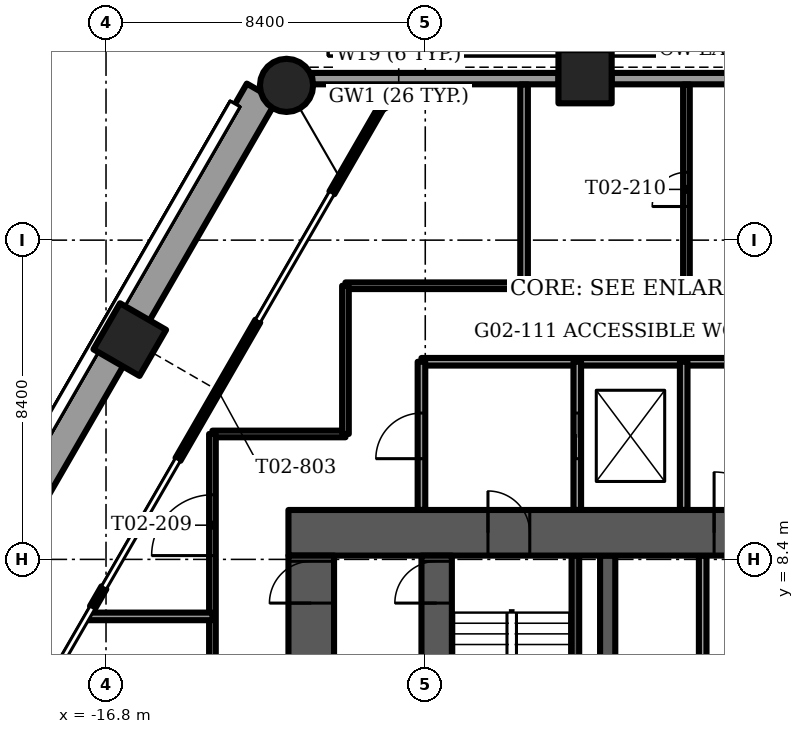
"""IFC4 building model, lengths in metres.
Left out: names, types, materials, properties, quantities, classifications, styles, units other than length and angle.
Written with IfcOpenShell. Run it as: python <this file> out.ifc"""

import sys

from ifc_helpers import new_model, si_unit, direction, frame, frame_2d, origin, origin_2d, place, context, subcontext, project, spatial, rectangle, circle, extrude, element, fill, save


model = new_model("IFC4")
c1 = context("Model", 3, precision=1e-05, world=origin(), true_north=direction((0.0, 1.0)))
c2 = subcontext(c1, "Body", "Model", "MODEL_VIEW")
j1 = project(units=[si_unit("LENGTHUNIT", "METRE"), si_unit("PLANEANGLEUNIT", "RADIAN")], contexts=[c1])
p1 = place(None, origin())
s1 = spatial("IfcSite", under=j1, at=p1, CompositionType="ELEMENT")
p2 = place(p1, origin())
s2 = spatial("IfcBuilding", under=s1, at=p2, CompositionType="ELEMENT")
p3 = place(p2, frame((0.0, 0.0, 10.0)))
s3 = spatial("IfcBuildingStorey", under=s2, at=p3, CompositionType="ELEMENT", Elevation=10.0)
p4 = place(p3, frame((-12.051, 20.872, -1.2), z_axis=(0.0, 0.0, 1.0), x_axis=(1.0, 0.0, 0.0)))
e1 = element("IfcColumn", 1, at=p4, inside=s3, PredefinedType="COLUMN", context=c2, shape_type="SweptSolid", body=[
    extrude(circle(Radius=0.7, at=origin_2d()), origin(), (0.0, 0.0, 1.0), 4.5),
])
for number, where, z_axis, x_axis in (
    (2, (-4.195, 21.1, -1.2), (0.0, 0.0, 1.0), (1.0, 0.0, 0.0)),
    (3, (-16.175, 14.183, -1.2), (0.0, 0.0, 1.0), (0.5, 0.866, 0.0)),
):
    element("IfcColumn", number, at=place(p3, frame(where, z_axis=z_axis, x_axis=x_axis)), inside=s3, PredefinedType="COLUMN", context=c2, shape_type="SweptSolid", body=[
        extrude(rectangle(XDim=1.4, YDim=1.4, at=origin_2d()), origin(), (0.0, 0.0, 1.0), 4.5),
    ])
p5 = place(p3, frame((-12.0, 9.1, -0.3), z_axis=(0.0, 0.0, 1.0), x_axis=(1.0, 0.0, 0.0)))
e4 = element("IfcWall", 4, at=p5, inside=s3, PredefinedType="SHEAR", context=c2, shape_type="SweptSolid", body=[
    extrude(rectangle(XDim=24.0, YDim=1.2, at=frame_2d((12.0, 0.0))), origin(), (0.0, 0.0, 1.0), 4.5),
])
p6 = place(p5, frame((11.2, 0.0, 0.0)))
e5 = element("IfcOpeningElement", 5, at=p6, cuts=e4, PredefinedType="OPENING", context=c2, shape_type="SweptSolid", body=[
    extrude(rectangle(XDim=1.6, YDim=2.1, at=frame_2d((0.8, 1.05))), frame((0.0, 0.6, 0.0), z_axis=(0.0, -1.0, 0.0), x_axis=(1.0, 0.0, 0.0)), (0.0, 0.0, 1.0), 1.2),
])
p7 = place(p5, frame((5.25, 0.0, 0.0)))
e6 = element("IfcOpeningElement", 6, at=p7, cuts=e4, PredefinedType="OPENING", context=c2, shape_type="SweptSolid", body=[
    extrude(rectangle(XDim=1.1, YDim=2.1, at=frame_2d((0.55, 1.05))), frame((0.0, 0.6, 0.0), z_axis=(0.0, -1.0, 0.0), x_axis=(1.0, 0.0, 0.0)), (0.0, 0.0, 1.0), 1.2),
])
p8 = place(p5, frame((17.65, 0.0, 0.0)))
e7 = element("IfcOpeningElement", 7, at=p8, cuts=e4, PredefinedType="OPENING", context=c2, shape_type="SweptSolid", body=[
    extrude(rectangle(XDim=1.1, YDim=2.1, at=frame_2d((0.55, 1.05))), frame((0.0, 0.6, 0.0), z_axis=(0.0, -1.0, 0.0), x_axis=(1.0, 0.0, 0.0)), (0.0, 0.0, 1.0), 1.2),
])
p9 = place(p3, frame((-8.1, -0.5, -0.3), z_axis=(0.0, 0.0, 1.0), x_axis=(0.0, 1.0, 0.0)))
e8 = element("IfcWall", 8, at=p9, inside=s3, PredefinedType="SHEAR", context=c2, shape_type="SweptSolid", body=[
    extrude(rectangle(XDim=9.0, YDim=0.8, at=frame_2d((4.5, 0.0))), origin(), (0.0, 0.0, 1.0), 4.5),
])
p10 = place(p9, frame((7.75, 0.0, 0.0)))
e9 = element("IfcOpeningElement", 9, at=p10, cuts=e8, PredefinedType="OPENING", context=c2, shape_type="SweptSolid", body=[
    extrude(rectangle(XDim=1.1, YDim=2.1, at=frame_2d((0.55, 1.05))), frame((0.0, 0.4, 0.0), z_axis=(0.0, -1.0, 0.0), x_axis=(1.0, 0.0, 0.0)), (0.0, 0.0, 1.0), 0.8),
])
p11 = place(p3, frame((-3.6, -0.5, -0.3), z_axis=(0.0, 0.0, 1.0), x_axis=(0.0, 1.0, 0.0)))
e10 = element("IfcWall", 10, at=p11, inside=s3, PredefinedType="SHEAR", context=c2, shape_type="SweptSolid", body=[
    extrude(rectangle(XDim=9.0, YDim=0.4, at=frame_2d((4.5, 0.0))), origin(), (0.0, 0.0, 1.0), 4.5),
])
p12 = place(p3, frame((-11.4, -0.5, -0.3), z_axis=(0.0, 0.0, 1.0), x_axis=(0.0, 1.0, 0.0)))
e11 = element("IfcWall", 11, at=p12, inside=s3, PredefinedType="SHEAR", context=c2, shape_type="SweptSolid", body=[
    extrude(rectangle(XDim=9.0, YDim=1.2, at=frame_2d((4.5, 0.0))), origin(), (0.0, 0.0, 1.0), 4.5),
])
p13 = place(p12, frame((7.75, 0.0, 0.0)))
e12 = element("IfcOpeningElement", 12, at=p13, cuts=e11, PredefinedType="OPENING", context=c2, shape_type="SweptSolid", body=[
    extrude(rectangle(XDim=1.1, YDim=2.1, at=frame_2d((0.55, 1.05))), frame((0.0, 0.6, 0.0), z_axis=(0.0, -1.0, 0.0), x_axis=(1.0, 0.0, 0.0)), (0.0, 0.0, 1.0), 1.2),
])
p14 = place(p12, frame((0.55, 0.0, 0.0)))
e13 = element("IfcOpeningElement", 13, at=p14, cuts=e11, PredefinedType="OPENING", context=c2, shape_type="SweptSolid", body=[
    extrude(rectangle(XDim=1.2, YDim=2.1, at=frame_2d((0.6, 1.05))), frame((0.0, 0.6, 0.0), z_axis=(0.0, -1.0, 0.0), x_axis=(1.0, 0.0, 0.0)), (0.0, 0.0, 1.0), 1.2),
])
p15 = place(p12, frame((3.0, 0.0, 0.0)))
e14 = element("IfcOpeningElement", 14, at=p15, cuts=e11, PredefinedType="OPENING", context=c2, shape_type="SweptSolid", body=[
    extrude(rectangle(XDim=1.2, YDim=2.1, at=frame_2d((0.6, 1.05))), frame((0.0, 0.6, 0.0), z_axis=(0.0, -1.0, 0.0), x_axis=(1.0, 0.0, 0.0)), (0.0, 0.0, 1.0), 1.2),
])
p16 = place(p3, frame((-12.705, 20.694, 0.0), z_axis=(0.0, 0.0, 1.0), x_axis=(-0.500005133765, -0.866022439784, 0.0)))
e15 = element("IfcWall", 15, at=p16, inside=s3, PredefinedType="PARAPET", context=c2, shape_type="SweptSolid", body=[
    extrude(rectangle(XDim=6.704, YDim=0.9, at=frame_2d((3.352, 0.0))), origin(), (0.0, 0.0, 1.0), 1.1),
])
p17 = place(p3, frame((-16.727, 13.728, 0.0), z_axis=(0.0, 0.0, 1.0), x_axis=(-0.499997206141, -0.866027016814, 0.0)))
e16 = element("IfcWall", 16, at=p17, inside=s3, PredefinedType="PARAPET", context=c2, shape_type="SweptSolid", body=[
    extrude(rectangle(XDim=7.051, YDim=0.9, at=frame_2d((3.525, 0.0))), origin(), (0.0, 0.0, 1.0), 1.1),
])
p18 = place(p3, frame((3.495, 21.05, 0.0), z_axis=(0.0, 0.0, 1.0), x_axis=(-1.0, 0.0, 0.0)))
e17 = element("IfcWall", 17, at=p18, inside=s3, PredefinedType="SOLIDWALL", context=c2, shape_type="SweptSolid", body=[
    extrude(rectangle(XDim=6.991, YDim=0.3, at=frame_2d((3.495, 0.0))), origin(), (0.0, 0.0, 1.0), 3.3),
])
p19 = place(p3, frame((-4.896, 21.05, 0.0), z_axis=(0.0, 0.0, 1.0), x_axis=(-1.0, 0.0, 0.0)))
e18 = element("IfcWall", 18, at=p19, inside=s3, PredefinedType="SOLIDWALL", context=c2, shape_type="SweptSolid", body=[
    extrude(rectangle(XDim=6.481, YDim=0.3, at=frame_2d((3.241, 0.0))), origin(), (0.0, 0.0, 1.0), 3.3),
])
p20 = place(p3, frame((-12.806, 14.668, 0.0), z_axis=(0.0, 0.0, 1.0), x_axis=(-0.500027713859, -0.866009402589, 0.0)))
e19 = element("IfcWall", 19, at=p20, inside=s3, PredefinedType="SOLIDWALL", context=c2, shape_type="SweptSolid", body=[
    extrude(rectangle(XDim=4.2, YDim=0.15, at=frame_2d((2.1, 0.0))), origin(), (0.0, 0.0, 1.0), 4.2),
])
p21 = place(p20, frame((0.6, 0.0, 0.0)))
e20 = element("IfcOpeningElement", 20, at=p21, cuts=e19, PredefinedType="OPENING", context=c2, shape_type="SweptSolid", body=[
    extrude(rectangle(XDim=3.0, YDim=2.4, at=frame_2d((1.5, 1.2))), frame((0.0, 0.075, 0.0), z_axis=(0.0, -1.0, 0.0), x_axis=(1.0, 0.0, 0.0)), (0.0, 0.0, 1.0), 0.15),
])
p22 = place(p3, frame((-9.56, 20.292, 0.0), z_axis=(0.0, 0.0, 1.0), x_axis=(-0.499945140294, -0.866057074734, 0.0)))
e21 = element("IfcWall", 21, at=p22, inside=s3, PredefinedType="SOLIDWALL", context=c2, shape_type="SweptSolid", body=[
    extrude(rectangle(XDim=2.594, YDim=0.15, at=frame_2d((1.297, 0.0))), origin(), (0.0, 0.0, 1.0), 4.2),
])
p23 = place(p3, frame((-16.856, 7.654, 0.0), z_axis=(0.0, 0.0, 1.0), x_axis=(-0.499945471869, -0.866056883327, 0.0)))
e22 = element("IfcWall", 22, at=p23, inside=s3, PredefinedType="SOLIDWALL", context=c2, shape_type="SweptSolid", body=[
    extrude(rectangle(XDim=0.6, YDim=0.15, at=frame_2d((0.3, 0.0))), origin(), (0.0, 0.0, 1.0), 4.2),
])
p24 = place(p3, frame((-8.637, 20.825, 0.0), z_axis=(0.0, 0.0, 1.0), x_axis=(-0.866048165231, -0.499960573946, 0.0)))
e23 = element("IfcWall", 23, at=p24, inside=s3, PredefinedType="SOLIDWALL", context=c2, shape_type="SweptSolid", body=[
    extrude(rectangle(XDim=1.065, YDim=0.15, at=frame_2d((0.532, 0.0))), origin(), (0.0, 0.0, 1.0), 4.2),
])
p25 = place(p24, frame((0.258, 0.0, 0.15)))
e24 = element("IfcOpeningElement", 24, at=p25, cuts=e23, PredefinedType="OPENING", context=c2, shape_type="SweptSolid", body=[
    extrude(rectangle(XDim=0.55, YDim=3.6, at=frame_2d((0.275, 1.8))), frame((0.0, 0.075, 0.0), z_axis=(0.0, -1.0, 0.0), x_axis=(1.0, 0.0, 0.0)), (0.0, 0.0, 1.0), 0.15),
])
p26 = place(p3, frame((-1.1, 5.6, 0.0), z_axis=(0.0, 0.0, 1.0), x_axis=(0.0, 1.0, 0.0)))
e25 = element("IfcWall", 25, at=p26, inside=s3, PredefinedType="PARTITIONING", context=c2, shape_type="SweptSolid", body=[
    extrude(rectangle(XDim=2.9, YDim=0.2, at=frame_2d((1.45, 0.0))), origin(), (0.0, 0.0, 1.0), 4.2),
])
p27 = place(p3, frame((-4.45, 0.9, -0.3), z_axis=(0.0, 0.0, 1.0), x_axis=(0.0, 1.0, 0.0)))
e26 = element("IfcWall", 26, at=p27, inside=s3, PredefinedType="SOLIDWALL", context=c2, shape_type="SweptSolid", body=[
    extrude(rectangle(XDim=7.6, YDim=0.2, at=frame_2d((3.8, 0.0))), origin(), (0.0, 0.0, 1.0), 4.5),
])
p28 = place(p3, frame((-8.5, 13.6, 0.0), z_axis=(0.0, 0.0, 1.0), x_axis=(1.0, 0.0, 0.0)))
e27 = element("IfcWall", 27, at=p28, inside=s3, PredefinedType="PARTITIONING", context=c2, shape_type="SweptSolid", body=[
    extrude(rectangle(XDim=17.0, YDim=0.2, at=frame_2d((8.5, 0.0))), origin(), (0.0, 0.0, 1.0), 4.2),
])
p29 = place(p3, frame((-8.5, 9.7, 0.0), z_axis=(0.0, 0.0, 1.0), x_axis=(0.0, 1.0, 0.0)))
e28 = element("IfcWall", 28, at=p29, inside=s3, PredefinedType="PARTITIONING", context=c2, shape_type="SweptSolid", body=[
    extrude(rectangle(XDim=3.9, YDim=0.2, at=frame_2d((1.95, 0.0))), origin(), (0.0, 0.0, 1.0), 4.2),
])
p30 = place(p29, frame((1.35, 0.0, 0.0)))
e29 = element("IfcOpeningElement", 29, at=p30, cuts=e28, PredefinedType="OPENING", context=c2, shape_type="SweptSolid", body=[
    extrude(rectangle(XDim=1.2, YDim=2.1, at=frame_2d((0.6, 1.05))), frame((0.0, 0.1, 0.0), z_axis=(0.0, -1.0, 0.0), x_axis=(1.0, 0.0, 0.0)), (0.0, 0.0, 1.0), 0.2),
])
p31 = place(p3, frame((-4.4, 9.7, 0.0), z_axis=(0.0, 0.0, 1.0), x_axis=(0.0, 1.0, 0.0)))
e30 = element("IfcWall", 30, at=p31, inside=s3, PredefinedType="PARTITIONING", context=c2, shape_type="SweptSolid", body=[
    extrude(rectangle(XDim=3.9, YDim=0.2, at=frame_2d((1.95, 0.0))), origin(), (0.0, 0.0, 1.0), 4.2),
])
p32 = place(p31, frame((1.35, 0.0, 0.0)))
e31 = element("IfcOpeningElement", 31, at=p32, cuts=e30, PredefinedType="OPENING", context=c2, shape_type="SweptSolid", body=[
    extrude(rectangle(XDim=1.2, YDim=2.1, at=frame_2d((0.6, 1.05))), frame((0.0, 0.1, 0.0), z_axis=(0.0, -1.0, 0.0), x_axis=(1.0, 0.0, 0.0)), (0.0, 0.0, 1.0), 0.2),
])
p33 = place(p3, frame((-1.6, 9.7, 0.0), z_axis=(0.0, 0.0, 1.0), x_axis=(0.0, 1.0, 0.0)))
e32 = element("IfcWall", 32, at=p33, inside=s3, PredefinedType="PARTITIONING", context=c2, shape_type="SweptSolid", body=[
    extrude(rectangle(XDim=3.9, YDim=0.2, at=frame_2d((1.95, 0.0))), origin(), (0.0, 0.0, 1.0), 4.2),
])
p34 = place(p3, frame((-14.0, 11.7, 0.0), z_axis=(0.0, 0.0, 1.0), x_axis=(1.0, 0.0, 0.0)))
e33 = element("IfcWall", 33, at=p34, inside=s3, PredefinedType="PARTITIONING", context=c2, shape_type="SweptSolid", body=[
    extrude(rectangle(XDim=3.5, YDim=0.175, at=frame_2d((1.75, 0.0))), origin(), (0.0, 0.0, 1.0), 4.2),
])
p35 = place(p3, frame((-10.5, 15.6, 0.0), z_axis=(0.0, 0.0, 1.0), x_axis=(1.0, 0.0, 0.0)))
e34 = element("IfcWall", 34, at=p35, inside=s3, PredefinedType="PARTITIONING", context=c2, shape_type="SweptSolid", body=[
    extrude(rectangle(XDim=8.972, YDim=0.175, at=frame_2d((4.486, 0.0))), origin(), (0.0, 0.0, 1.0), 4.2),
])
p36 = place(p3, frame((-14.0, -3.7, 0.0), z_axis=(0.0, 0.0, 1.0), x_axis=(0.0, 1.0, 0.0)))
e35 = element("IfcWall", 35, at=p36, inside=s3, PredefinedType="PARTITIONING", context=c2, shape_type="SweptSolid", body=[
    extrude(rectangle(XDim=15.4, YDim=0.175, at=frame_2d((7.7, 0.0))), origin(), (0.0, 0.0, 1.0), 4.2),
])
p37 = place(p36, frame((4.8, 0.0, 0.0)))
e36 = element("IfcOpeningElement", 36, at=p37, cuts=e35, PredefinedType="OPENING", context=c2, shape_type="SweptSolid", body=[
    extrude(rectangle(XDim=1.0, YDim=2.1, at=frame_2d((0.5, 1.05))), frame((0.0, 0.087, 0.0), z_axis=(0.0, -1.0, 0.0), x_axis=(1.0, 0.0, 0.0)), (0.0, 0.0, 1.0), 0.175),
])
p38 = place(p36, frame((12.2, 0.0, 0.0)))
e37 = element("IfcOpeningElement", 37, at=p38, cuts=e35, PredefinedType="OPENING", context=c2, shape_type="SweptSolid", body=[
    extrude(rectangle(XDim=1.6, YDim=2.1, at=frame_2d((0.8, 1.05))), frame((0.0, 0.087, 0.0), z_axis=(0.0, -1.0, 0.0), x_axis=(1.0, 0.0, 0.0)), (0.0, 0.0, 1.0), 0.175),
])
p39 = place(p3, frame((-10.5, 11.7, 0.0), z_axis=(0.0, 0.0, 1.0), x_axis=(0.0, 1.0, 0.0)))
e38 = element("IfcWall", 38, at=p39, inside=s3, PredefinedType="PARTITIONING", context=c2, shape_type="SweptSolid", body=[
    extrude(rectangle(XDim=3.9, YDim=0.175, at=frame_2d((1.95, 0.0))), origin(), (0.0, 0.0, 1.0), 4.2),
])
p40 = place(p3, frame((-1.528, 15.6, 0.0), z_axis=(0.0, 0.0, 1.0), x_axis=(0.0, 1.0, 0.0)))
e39 = element("IfcWall", 39, at=p40, inside=s3, PredefinedType="PARTITIONING", context=c2, shape_type="SweptSolid", body=[
    extrude(rectangle(XDim=5.295, YDim=0.175, at=frame_2d((2.647, 0.0))), origin(), (0.0, 0.0, 1.0), 4.2),
])
p41 = place(p40, frame((2.085, 0.0, 0.0)))
e40 = element("IfcOpeningElement", 40, at=p41, cuts=e39, PredefinedType="OPENING", context=c2, shape_type="SweptSolid", body=[
    extrude(rectangle(XDim=0.9, YDim=2.1, at=frame_2d((0.45, 1.05))), frame((0.0, 0.087, 0.0), z_axis=(0.0, -1.0, 0.0), x_axis=(1.0, 0.0, 0.0)), (0.0, 0.0, 1.0), 0.175),
])
p42 = place(p3, frame((-17.271, 6.9, 0.0), z_axis=(0.0, 0.0, 1.0), x_axis=(1.0, 0.0, 0.0)))
e41 = element("IfcWall", 41, at=p42, inside=s3, PredefinedType="PARTITIONING", context=c2, shape_type="SweptSolid", body=[
    extrude(rectangle(XDim=3.271, YDim=0.2, at=frame_2d((1.635, 0.0))), origin(), (0.0, 0.0, 1.0), 4.2),
])
p43 = place(p3, frame((-5.8, 15.6, 0.0), z_axis=(0.0, 0.0, 1.0), x_axis=(0.0, 1.0, 0.0)))
e42 = element("IfcWall", 42, at=p43, inside=s3, PredefinedType="PARTITIONING", context=c2, shape_type="SweptSolid", body=[
    extrude(rectangle(XDim=5.295, YDim=0.2, at=frame_2d((2.647, 0.0))), origin(), (0.0, 0.0, 1.0), 4.2),
])
p44 = place(p21, origin())
e43 = element("IfcDoor", 43, at=p44, inside=s3, OperationType="SLIDING_TO_RIGHT", PredefinedType="DOOR", context=c2, shape_type="SweptSolid", body=[
    extrude(rectangle(XDim=3.0, YDim=2.4, at=frame_2d((1.5, 1.2))), frame((0.0, 0.025, 0.0), z_axis=(0.0, -1.0, 0.0), x_axis=(1.0, 0.0, 0.0)), (0.0, 0.0, 1.0), 0.05),
])
fill(e20, e43)
p45 = place(p25, origin())
e44 = element("IfcWindow", 44, at=p45, inside=s3, PartitioningType="SINGLE_PANEL", PredefinedType="WINDOW", context=c2, shape_type="SweptSolid", body=[
    extrude(rectangle(XDim=0.55, YDim=3.6, at=frame_2d((0.275, 1.8))), frame((0.0, 0.03, 0.0), z_axis=(0.0, -1.0, 0.0), x_axis=(1.0, 0.0, 0.0)), (0.0, 0.0, 1.0), 0.06),
])
fill(e24, e44)
p46 = place(p6, origin())
e45 = element("IfcDoor", 45, at=p46, inside=s3, OperationType="DOUBLE_DOOR_SINGLE_SWING", PredefinedType="DOOR", context=c2, shape_type="SweptSolid", body=[
    extrude(rectangle(XDim=1.6, YDim=2.1, at=frame_2d((0.8, 1.05))), frame((0.0, 0.025, 0.0), z_axis=(0.0, -1.0, 0.0), x_axis=(1.0, 0.0, 0.0)), (0.0, 0.0, 1.0), 0.05),
])
fill(e5, e45)
p47 = place(p7, origin())
e46 = element("IfcDoor", 46, at=p47, inside=s3, OperationType="SINGLE_SWING_LEFT", PredefinedType="DOOR", context=c2, shape_type="SweptSolid", body=[
    extrude(rectangle(XDim=1.1, YDim=2.1, at=frame_2d((0.55, 1.05))), frame((0.0, 0.025, 0.0), z_axis=(0.0, -1.0, 0.0), x_axis=(1.0, 0.0, 0.0)), (0.0, 0.0, 1.0), 0.05),
])
fill(e6, e46)
p48 = place(p10, origin())
e47 = element("IfcDoor", 47, at=p48, inside=s3, OperationType="SINGLE_SWING_RIGHT", PredefinedType="DOOR", context=c2, shape_type="SweptSolid", body=[
    extrude(rectangle(XDim=1.1, YDim=2.1, at=frame_2d((0.55, 1.05))), frame((0.0, 0.025, 0.0), z_axis=(0.0, -1.0, 0.0), x_axis=(1.0, 0.0, 0.0)), (0.0, 0.0, 1.0), 0.05),
])
fill(e9, e47)
p49 = place(p32, origin())
e48 = element("IfcDoor", 48, at=p49, inside=s3, OperationType="SLIDING_TO_LEFT", PredefinedType="DOOR", context=c2, shape_type="SweptSolid", body=[
    extrude(rectangle(XDim=1.2, YDim=2.1, at=frame_2d((0.6, 1.05))), frame((0.0, 0.025, 0.0), z_axis=(0.0, -1.0, 0.0), x_axis=(1.0, 0.0, 0.0)), (0.0, 0.0, 1.0), 0.05),
])
fill(e31, e48)
p50 = place(p30, origin())
e49 = element("IfcDoor", 49, at=p50, inside=s3, OperationType="SINGLE_SWING_LEFT", PredefinedType="DOOR", context=c2, shape_type="SweptSolid", body=[
    extrude(rectangle(XDim=1.2, YDim=2.1, at=frame_2d((0.6, 1.05))), frame((0.0, 0.025, 0.0), z_axis=(0.0, -1.0, 0.0), x_axis=(1.0, 0.0, 0.0)), (0.0, 0.0, 1.0), 0.05),
])
fill(e29, e49)
p51 = place(p13, origin())
e50 = element("IfcDoor", 50, at=p51, inside=s3, OperationType="SINGLE_SWING_LEFT", PredefinedType="DOOR", context=c2, shape_type="SweptSolid", body=[
    extrude(rectangle(XDim=1.1, YDim=2.1, at=frame_2d((0.55, 1.05))), frame((0.0, 0.025, 0.0), z_axis=(0.0, -1.0, 0.0), x_axis=(1.0, 0.0, 0.0)), (0.0, 0.0, 1.0), 0.05),
])
fill(e12, e50)
p52 = place(p38, origin())
e51 = element("IfcDoor", 51, at=p52, inside=s3, OperationType="DOUBLE_DOOR_SINGLE_SWING", PredefinedType="DOOR", context=c2, shape_type="SweptSolid", body=[
    extrude(rectangle(XDim=1.6, YDim=2.1, at=frame_2d((0.8, 1.05))), frame((0.0, 0.025, 0.0), z_axis=(0.0, -1.0, 0.0), x_axis=(1.0, 0.0, 0.0)), (0.0, 0.0, 1.0), 0.05),
])
fill(e37, e51)
p53 = place(p41, origin())
e52 = element("IfcDoor", 52, at=p53, inside=s3, OperationType="SINGLE_SWING_RIGHT", PredefinedType="DOOR", context=c2, shape_type="SweptSolid", body=[
    extrude(rectangle(XDim=0.9, YDim=2.1, at=frame_2d((0.45, 1.05))), frame((0.0, 0.025, 0.0), z_axis=(0.0, -1.0, 0.0), x_axis=(1.0, 0.0, 0.0)), (0.0, 0.0, 1.0), 0.05),
])
fill(e40, e52)
save(model, sys.argv[1])
